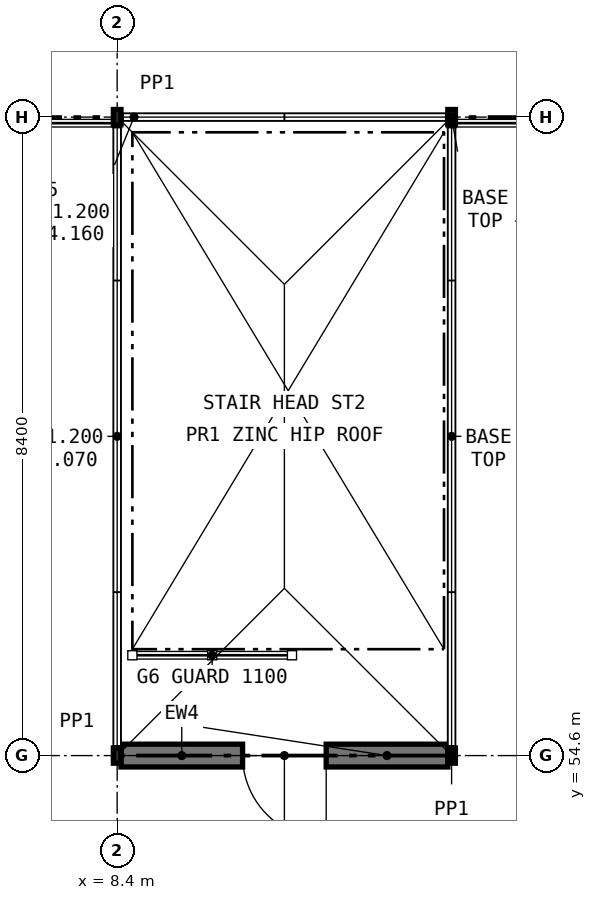
"""IFC4 building model, lengths in metres.
Left out: names, types, materials, properties, quantities, classifications, styles, units other than length and angle.
Written with IfcOpenShell. Run it as: python <this file> out.ifc"""

import sys

from ifc_helpers import new_model, si_unit, direction, frame, frame_2d, origin, origin_2d, place, context, subcontext, project, spatial, rectangle, hollow_rectangle, extrude, element, fill, save


model = new_model("IFC4")
c1 = context("Model", 3, precision=1e-05, world=origin(), true_north=direction((0.0, 1.0)))
c2 = subcontext(c1, "Body", "Model", "MODEL_VIEW")
j1 = project(units=[si_unit("LENGTHUNIT", "METRE"), si_unit("PLANEANGLEUNIT", "RADIAN")], contexts=[c1])
p1 = place(None, origin())
s1 = spatial("IfcSite", under=j1, at=p1, CompositionType="ELEMENT")
p2 = place(p1, origin())
s2 = spatial("IfcBuilding", under=s1, at=p2, CompositionType="ELEMENT")
p3 = place(p2, frame((0.0, 0.0, 31.2)))
s3 = spatial("IfcBuildingStorey", under=s2, at=p3, CompositionType="ELEMENT", Elevation=31.2)
p4 = place(p3, frame((8.4, 63.0, 0.0), z_axis=(0.0, 0.0, 1.0), x_axis=(1.0, 0.0, 0.0)))
e1 = element("IfcColumn", 1, at=p4, inside=s3, PredefinedType="COLUMN", context=c2, shape_type="SweptSolid", body=[
    extrude(hollow_rectangle(XDim=0.1, YDim=0.2, WallThickness=0.008, at=origin_2d()), origin(), (0.0, 0.0, 1.0), 3.2),
])
p5 = place(p3, frame((12.8, 63.0, -0.2), z_axis=(0.0, 0.0, 1.0), x_axis=(1.0, 0.0, 0.0)))
e2 = element("IfcColumn", 2, at=p5, inside=s3, PredefinedType="COLUMN", context=c2, shape_type="SweptSolid", body=[
    extrude(hollow_rectangle(XDim=0.1, YDim=0.2, WallThickness=0.008, at=origin_2d()), origin(), (0.0, 0.0, 1.0), 3.4),
])
p6 = place(p3, frame((8.4, 54.6, 0.0), z_axis=(0.0, 0.0, 1.0), x_axis=(1.0, 0.0, 0.0)))
e3 = element("IfcColumn", 3, at=p6, inside=s3, PredefinedType="COLUMN", context=c2, shape_type="SweptSolid", body=[
    extrude(hollow_rectangle(XDim=0.1, YDim=0.2, WallThickness=0.008, at=origin_2d()), origin(), (0.0, 0.0, 1.0), 3.2),
])
p7 = place(p3, frame((12.8, 54.6, -0.2), z_axis=(0.0, 0.0, 1.0), x_axis=(1.0, 0.0, 0.0)))
e4 = element("IfcColumn", 4, at=p7, inside=s3, PredefinedType="COLUMN", context=c2, shape_type="SweptSolid", body=[
    extrude(hollow_rectangle(XDim=0.1, YDim=0.2, WallThickness=0.008, at=origin_2d()), origin(), (0.0, 0.0, 1.0), 3.4),
])
p8 = place(p3, frame((8.45, 54.6, 0.0), z_axis=(0.0, 0.0, 1.0), x_axis=(1.0, 0.0, 0.0)))
e5 = element("IfcWall", 5, at=p8, inside=s3, PredefinedType="STANDARD", context=c2, shape_type="SweptSolid", body=[
    extrude(rectangle(XDim=4.3, YDim=0.3, at=frame_2d((2.15, 0.0))), origin(), (0.0, 0.0, 1.0), 3.2),
])
p9 = place(p8, frame((1.6, 0.0, 0.0)))
e6 = element("IfcOpeningElement", 6, at=p9, cuts=e5, PredefinedType="OPENING", context=c2, shape_type="SweptSolid", body=[
    extrude(rectangle(XDim=1.1, YDim=2.1, at=frame_2d((0.55, 1.05))), frame((0.0, 0.16, 0.0), z_axis=(0.0, -1.0, 0.0), x_axis=(1.0, 0.0, 0.0)), (0.0, 0.0, 1.0), 0.32),
])
p10 = place(p9, frame((1.1, 0.0, 0.0), z_axis=(0.0, 0.0, 1.0), x_axis=(-1.0, 0.0, 0.0)))
e7 = element("IfcDoor", 7, at=p10, inside=s3, OperationType="SINGLE_SWING_LEFT", PredefinedType="DOOR", context=c2, shape_type="SweptSolid", body=[
    extrude(rectangle(XDim=1.1, YDim=2.1, at=frame_2d((0.55, 1.05))), frame((0.0, 0.025, 0.0), z_axis=(0.0, -1.0, 0.0), x_axis=(1.0, 0.0, 0.0)), (0.0, 0.0, 1.0), 0.05),
])
fill(e6, e7)
save(model, sys.argv[1])
